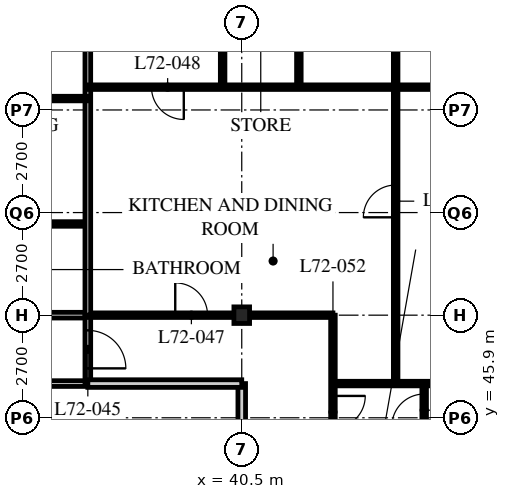
"""IFC4 building model, lengths in metres.
Left out: names, types, materials, properties, quantities, classifications, styles, units other than length and angle.
Written with IfcOpenShell. Run it as: python <this file> out.ifc"""

import sys

from ifc_helpers import new_model, si_unit, direction, frame, frame_2d, origin, origin_2d, place, context, subcontext, project, spatial, rectangle, i_section, extrude, element, fill, save


model = new_model("IFC4")
c1 = context("Model", 3, precision=1e-05, world=origin(), true_north=direction((0.0, 1.0)))
c2 = subcontext(c1, "Body", "Model", "MODEL_VIEW")
j1 = project(units=[si_unit("LENGTHUNIT", "METRE"), si_unit("PLANEANGLEUNIT", "RADIAN")], contexts=[c1])
p1 = place(None, origin())
s1 = spatial("IfcSite", under=j1, at=p1, CompositionType="ELEMENT")
p2 = place(p1, origin())
s2 = spatial("IfcBuilding", under=s1, at=p2, CompositionType="ELEMENT")
p3 = place(p2, frame((0.0, 0.0, 281.4)))
s3 = spatial("IfcBuildingStorey", under=s2, at=p3, CompositionType="ELEMENT", Elevation=281.4)
p4 = place(p3, frame((40.5, 48.6, 0.0), z_axis=(0.0, 0.0, 1.0), x_axis=(1.0, 0.0, 0.0)))
e1 = element("IfcColumn", 1, at=p4, inside=s3, PredefinedType="COLUMN", context=c2, shape_type="SweptSolid", body=[
    extrude(i_section(OverallWidth=0.412, OverallDepth=0.437, WebThickness=0.036, FlangeThickness=0.058, FilletRadius=0.015, at=origin_2d()), origin(), (0.0, 0.0, 1.0), 3.9),
])
p5 = place(p3, frame((12.15, 48.6, 0.0), z_axis=(0.0, 0.0, 1.0), x_axis=(1.0, 0.0, 0.0)))
e2 = element("IfcWall", 2, at=p5, inside=s3, PredefinedType="PARTITIONING", context=c2, shape_type="SweptSolid", body=[
    extrude(rectangle(XDim=24.3, YDim=0.15, at=frame_2d((12.15, 0.0))), origin(), (0.0, 0.0, 1.0), 3.078),
])
p6 = place(p5, frame((4.95, 0.0, 0.0)))
e3 = element("IfcOpeningElement", 3, at=p6, cuts=e2, PredefinedType="OPENING", context=c2, shape_type="SweptSolid", body=[
    extrude(rectangle(XDim=1.0, YDim=2.1, at=frame_2d((0.5, 1.05))), frame((0.0, 0.085, 0.0), z_axis=(0.0, -1.0, 0.0), x_axis=(1.0, 0.0, 0.0)), (0.0, 0.0, 1.0), 0.17),
])
p7 = place(p5, frame((16.6, 0.0, 0.0)))
e4 = element("IfcOpeningElement", 4, at=p7, cuts=e2, PredefinedType="OPENING", context=c2, shape_type="SweptSolid", body=[
    extrude(rectangle(XDim=1.0, YDim=2.1, at=frame_2d((0.5, 1.05))), frame((0.0, 0.085, 0.0), z_axis=(0.0, -1.0, 0.0), x_axis=(1.0, 0.0, 0.0)), (0.0, 0.0, 1.0), 0.17),
])
p8 = place(p5, frame((1.525, 0.0, 0.0)))
e5 = element("IfcOpeningElement", 5, at=p8, cuts=e2, PredefinedType="OPENING", context=c2, shape_type="SweptSolid", body=[
    extrude(rectangle(XDim=1.0, YDim=2.1, at=frame_2d((0.5, 1.05))), frame((0.0, 0.085, 0.0), z_axis=(0.0, -1.0, 0.0), x_axis=(1.0, 0.0, 0.0)), (0.0, 0.0, 1.0), 0.17),
])
p9 = place(p3, frame((29.56, 46.8, 0.0), z_axis=(0.0, 0.0, 1.0), x_axis=(1.0, 0.0, 0.0)))
e6 = element("IfcWall", 6, at=p9, inside=s3, PredefinedType="PARTITIONING", context=c2, shape_type="SweptSolid", body=[
    extrude(rectangle(XDim=6.89, YDim=0.15, at=frame_2d((3.445, 0.0))), origin(), (0.0, 0.0, 1.0), 3.69),
])
p10 = place(p9, frame((2.69, 0.0, 0.0)))
e7 = element("IfcOpeningElement", 7, at=p10, cuts=e6, PredefinedType="OPENING", context=c2, shape_type="SweptSolid", body=[
    extrude(rectangle(XDim=1.0, YDim=2.1, at=frame_2d((0.5, 1.05))), frame((0.0, 0.085, 0.0), z_axis=(0.0, -1.0, 0.0), x_axis=(1.0, 0.0, 0.0)), (0.0, 0.0, 1.0), 0.17),
])
p11 = place(p3, frame((36.45, 46.8, 0.0), z_axis=(0.0, 0.0, 1.0), x_axis=(0.0, 1.0, 0.0)))
e8 = element("IfcWall", 8, at=p11, inside=s3, PredefinedType="PARTITIONING", context=c2, shape_type="SweptSolid", body=[
    extrude(rectangle(XDim=1.8, YDim=0.15, at=frame_2d((0.9, 0.0))), origin(), (0.0, 0.0, 1.0), 3.69),
])
p12 = place(p11, frame((0.4, 0.0, 0.0)))
e9 = element("IfcOpeningElement", 9, at=p12, cuts=e8, PredefinedType="OPENING", context=c2, shape_type="SweptSolid", body=[
    extrude(rectangle(XDim=1.0, YDim=2.1, at=frame_2d((0.5, 1.05))), frame((0.0, 0.085, 0.0), z_axis=(0.0, -1.0, 0.0), x_axis=(1.0, 0.0, 0.0)), (0.0, 0.0, 1.0), 0.17),
])
p13 = place(p3, frame((40.5, 40.5, 0.0), z_axis=(0.0, 0.0, 1.0), x_axis=(0.0, 1.0, 0.0)))
e10 = element("IfcWall", 10, at=p13, inside=s3, PredefinedType="SOLIDWALL", context=c2, shape_type="SweptSolid", body=[
    extrude(rectangle(XDim=6.3, YDim=0.2, at=frame_2d((3.15, 0.0))), origin(), (0.0, 0.0, 1.0), 3.078),
])
p14 = place(p3, frame((8.15, 51.0, 0.0), z_axis=(0.0, 0.0, 1.0), x_axis=(1.0, 0.0, 0.0)))
e11 = element("IfcWall", 11, at=p14, inside=s3, PredefinedType="PARTITIONING", context=c2, shape_type="SweptSolid", body=[
    extrude(rectangle(XDim=28.3, YDim=0.12, at=frame_2d((14.15, 0.0))), origin(), (0.0, 0.0, 1.0), 3.69),
])
p15 = place(p14, frame((9.025, 0.0, 0.0)))
e12 = element("IfcOpeningElement", 12, at=p15, cuts=e11, PredefinedType="OPENING", context=c2, shape_type="SweptSolid", body=[
    extrude(rectangle(XDim=0.85, YDim=2.1, at=frame_2d((0.425, 1.05))), frame((0.0, 0.07, 0.0), z_axis=(0.0, -1.0, 0.0), x_axis=(1.0, 0.0, 0.0)), (0.0, 0.0, 1.0), 0.14),
])
p16 = place(p14, frame((16.475, 0.0, 0.0)))
e13 = element("IfcOpeningElement", 13, at=p16, cuts=e11, PredefinedType="OPENING", context=c2, shape_type="SweptSolid", body=[
    extrude(rectangle(XDim=0.85, YDim=2.1, at=frame_2d((0.425, 1.05))), frame((0.0, 0.07, 0.0), z_axis=(0.0, -1.0, 0.0), x_axis=(1.0, 0.0, 0.0)), (0.0, 0.0, 1.0), 0.14),
])
p17 = place(p14, frame((21.175, 0.0, 0.0)))
e14 = element("IfcOpeningElement", 14, at=p17, cuts=e11, PredefinedType="OPENING", context=c2, shape_type="SweptSolid", body=[
    extrude(rectangle(XDim=0.85, YDim=2.1, at=frame_2d((0.425, 1.05))), frame((0.0, 0.07, 0.0), z_axis=(0.0, -1.0, 0.0), x_axis=(1.0, 0.0, 0.0)), (0.0, 0.0, 1.0), 0.14),
])
p18 = place(p14, frame((24.575, 0.0, 0.0)))
e15 = element("IfcOpeningElement", 15, at=p18, cuts=e11, PredefinedType="OPENING", context=c2, shape_type="SweptSolid", body=[
    extrude(rectangle(XDim=0.85, YDim=2.1, at=frame_2d((0.425, 1.05))), frame((0.0, 0.07, 0.0), z_axis=(0.0, -1.0, 0.0), x_axis=(1.0, 0.0, 0.0)), (0.0, 0.0, 1.0), 0.14),
])
p19 = place(p14, frame((6.725, 0.0, 0.0)))
e16 = element("IfcOpeningElement", 16, at=p19, cuts=e11, PredefinedType="OPENING", context=c2, shape_type="SweptSolid", body=[
    extrude(rectangle(XDim=0.85, YDim=2.1, at=frame_2d((0.425, 1.05))), frame((0.0, 0.07, 0.0), z_axis=(0.0, -1.0, 0.0), x_axis=(1.0, 0.0, 0.0)), (0.0, 0.0, 1.0), 0.14),
])
p20 = place(p14, frame((2.875, 0.0, 0.0)))
e17 = element("IfcOpeningElement", 17, at=p20, cuts=e11, PredefinedType="OPENING", context=c2, shape_type="SweptSolid", body=[
    extrude(rectangle(XDim=0.85, YDim=2.1, at=frame_2d((0.425, 1.05))), frame((0.0, 0.07, 0.0), z_axis=(0.0, -1.0, 0.0), x_axis=(1.0, 0.0, 0.0)), (0.0, 0.0, 1.0), 0.14),
])
p21 = place(p3, frame((42.9, 48.6, 0.0), z_axis=(0.0, 0.0, 1.0), x_axis=(0.0, -1.0, 0.0)))
e18 = element("IfcWall", 18, at=p21, inside=s3, PredefinedType="PARTITIONING", context=c2, shape_type="SweptSolid", body=[
    extrude(rectangle(XDim=12.15, YDim=0.12, at=frame_2d((6.075, 0.0))), origin(), (0.0, 0.0, 1.0), 3.69),
])
p22 = place(p21, frame((2.125, 0.0, 0.0)))
e19 = element("IfcOpeningElement", 19, at=p22, cuts=e18, PredefinedType="OPENING", context=c2, shape_type="SweptSolid", body=[
    extrude(rectangle(XDim=0.85, YDim=2.1, at=frame_2d((0.425, 1.05))), frame((0.0, 0.07, 0.0), z_axis=(0.0, -1.0, 0.0), x_axis=(1.0, 0.0, 0.0)), (0.0, 0.0, 1.0), 0.14),
])
p23 = place(p21, frame((8.425, 0.0, 0.0)))
e20 = element("IfcOpeningElement", 20, at=p23, cuts=e18, PredefinedType="OPENING", context=c2, shape_type="SweptSolid", body=[
    extrude(rectangle(XDim=0.85, YDim=2.1, at=frame_2d((0.425, 1.05))), frame((0.0, 0.07, 0.0), z_axis=(0.0, -1.0, 0.0), x_axis=(1.0, 0.0, 0.0)), (0.0, 0.0, 1.0), 0.14),
])
p24 = place(p3, frame((36.45, 48.6, 0.0), z_axis=(0.0, 0.0, 1.0), x_axis=(1.0, 0.0, 0.0)))
e21 = element("IfcWall", 21, at=p24, inside=s3, PredefinedType="PARTITIONING", context=c2, shape_type="SweptSolid", body=[
    extrude(rectangle(XDim=6.45, YDim=0.12, at=frame_2d((3.225, 0.0))), origin(), (0.0, 0.0, 1.0), 3.078),
])
p25 = place(p24, frame((2.3, 0.0, 0.0)))
e22 = element("IfcOpeningElement", 22, at=p25, cuts=e21, PredefinedType="OPENING", context=c2, shape_type="SweptSolid", body=[
    extrude(rectangle(XDim=0.85, YDim=2.1, at=frame_2d((0.425, 1.05))), frame((0.0, 0.07, 0.0), z_axis=(0.0, -1.0, 0.0), x_axis=(1.0, 0.0, 0.0)), (0.0, 0.0, 1.0), 0.14),
])
p26 = place(p3, frame((36.45, 46.8, 0.0), z_axis=(0.0, 0.0, 1.0), x_axis=(1.0, 0.0, 0.0)))
e23 = element("IfcWall", 23, at=p26, inside=s3, PredefinedType="SOLIDWALL", context=c2, shape_type="SweptSolid", body=[
    extrude(rectangle(XDim=4.05, YDim=0.2, at=frame_2d((2.025, 0.0))), origin(), (0.0, 0.0, 1.0), 3.69),
])
p27 = place(p3, frame((42.9, 46.8, 0.0), z_axis=(0.0, 0.0, 1.0), x_axis=(1.0, 0.0, 0.0)))
e24 = element("IfcWall", 24, at=p27, inside=s3, PredefinedType="PARTITIONING", context=c2, shape_type="SweptSolid", body=[
    extrude(rectangle(XDim=13.5, YDim=0.12, at=frame_2d((6.75, 0.0))), origin(), (0.0, 0.0, 1.0), 3.69),
])
p28 = place(p3, frame((36.45, 64.5, 0.0), z_axis=(0.0, 0.0, 1.0), x_axis=(0.0, -1.0, 0.0)))
e25 = element("IfcWall", 25, at=p28, inside=s3, PredefinedType="PARTITIONING", context=c2, shape_type="SweptSolid", body=[
    extrude(rectangle(XDim=15.9, YDim=0.15, at=frame_2d((7.95, 0.0))), origin(), (0.0, 0.0, 1.0), 3.69),
])
p29 = place(p3, frame((36.45, 54.6, 0.0), z_axis=(0.0, 0.0, 1.0), x_axis=(1.0, 0.0, 0.0)))
e26 = element("IfcWall", 26, at=p29, inside=s3, PredefinedType="PARTITIONING", context=c2, shape_type="SweptSolid", body=[
    extrude(rectangle(XDim=19.95, YDim=0.12, at=frame_2d((9.975, 0.0))), origin(), (0.0, 0.0, 1.0), 3.69),
])
p30 = place(p29, frame((1.675, 0.0, 0.0)))
e27 = element("IfcOpeningElement", 27, at=p30, cuts=e26, PredefinedType="OPENING", context=c2, shape_type="SweptSolid", body=[
    extrude(rectangle(XDim=0.85, YDim=2.1, at=frame_2d((0.425, 1.05))), frame((0.0, 0.07, 0.0), z_axis=(0.0, -1.0, 0.0), x_axis=(1.0, 0.0, 0.0)), (0.0, 0.0, 1.0), 0.14),
])
p31 = place(p3, frame((44.55, 64.5, 0.0), z_axis=(0.0, 0.0, 1.0), x_axis=(0.0, -1.0, 0.0)))
e28 = element("IfcWall", 28, at=p31, inside=s3, PredefinedType="PARTITIONING", context=c2, shape_type="SweptSolid", body=[
    extrude(rectangle(XDim=17.7, YDim=0.12, at=frame_2d((8.85, 0.0))), origin(), (0.0, 0.0, 1.0), 3.69),
])
p32 = place(p31, frame((12.475, 0.0, 0.0)))
e29 = element("IfcOpeningElement", 29, at=p32, cuts=e28, PredefinedType="OPENING", context=c2, shape_type="SweptSolid", body=[
    extrude(rectangle(XDim=0.85, YDim=2.1, at=frame_2d((0.425, 1.05))), frame((0.0, 0.07, 0.0), z_axis=(0.0, -1.0, 0.0), x_axis=(1.0, 0.0, 0.0)), (0.0, 0.0, 1.0), 0.14),
])
p33 = place(p31, frame((4.525, 0.0, 0.0)))
e30 = element("IfcOpeningElement", 30, at=p33, cuts=e28, PredefinedType="OPENING", context=c2, shape_type="SweptSolid", body=[
    extrude(rectangle(XDim=0.85, YDim=2.1, at=frame_2d((0.425, 1.05))), frame((0.0, 0.07, 0.0), z_axis=(0.0, -1.0, 0.0), x_axis=(1.0, 0.0, 0.0)), (0.0, 0.0, 1.0), 0.14),
])
p34 = place(p3, frame((45.3, 46.8, 0.0), z_axis=(0.0, 0.0, 1.0), x_axis=(0.0, -1.0, 0.0)))
e31 = element("IfcWall", 31, at=p34, inside=s3, PredefinedType="PARTITIONING", context=c2, shape_type="SweptSolid", body=[
    extrude(rectangle(XDim=4.01, YDim=0.12, at=frame_2d((2.005, 0.0))), origin(), (0.0, 0.0, 1.0), 3.69),
])
p35 = place(p34, frame((0.275, 0.0, 0.0)))
e32 = element("IfcOpeningElement", 32, at=p35, cuts=e31, PredefinedType="OPENING", context=c2, shape_type="SweptSolid", body=[
    extrude(rectangle(XDim=0.85, YDim=2.1, at=frame_2d((0.425, 1.05))), frame((0.0, 0.07, 0.0), z_axis=(0.0, -1.0, 0.0), x_axis=(1.0, 0.0, 0.0)), (0.0, 0.0, 1.0), 0.14),
])
p36 = place(p3, frame((32.4, 54.3, 0.0), z_axis=(0.0, 0.0, 1.0), x_axis=(1.0, 0.0, 0.0)))
e33 = element("IfcWall", 33, at=p36, inside=s3, PredefinedType="PARTITIONING", context=c2, shape_type="SweptSolid", body=[
    extrude(rectangle(XDim=4.05, YDim=0.12, at=frame_2d((2.025, 0.0))), origin(), (0.0, 0.0, 1.0), 3.69),
])
p37 = place(p36, frame((1.6, 0.0, 0.0)))
e34 = element("IfcOpeningElement", 34, at=p37, cuts=e33, PredefinedType="OPENING", context=c2, shape_type="SweptSolid", body=[
    extrude(rectangle(XDim=0.85, YDim=2.1, at=frame_2d((0.425, 1.05))), frame((0.0, 0.07, 0.0), z_axis=(0.0, -1.0, 0.0), x_axis=(1.0, 0.0, 0.0)), (0.0, 0.0, 1.0), 0.14),
])
for number, where, z_axis, x_axis in (
    (35, (39.997, 54.6, 0.0), (0.0, 0.0, 1.0), (0.0, 1.0, 0.0)),
    (36, (42.003, 54.6, 0.0), (0.0, 0.0, 1.0), (0.0, 1.0, 0.0)),
):
    element("IfcWall", number, at=place(p3, frame(where, z_axis=z_axis, x_axis=x_axis)), inside=s3, PredefinedType="PARTITIONING", context=c2, shape_type="SweptSolid", body=[
        extrude(rectangle(XDim=2.363, YDim=0.12, at=frame_2d((1.181, 0.0))), origin(), (0.0, 0.0, 1.0), 3.69),
    ])
p38 = place(p12, origin())
e37 = element("IfcDoor", 37, at=p38, inside=s3, OperationType="SINGLE_SWING_RIGHT", PredefinedType="DOOR", context=c2, shape_type="SweptSolid", body=[
    extrude(rectangle(XDim=1.0, YDim=2.1, at=frame_2d((0.5, 1.05))), frame((0.0, 0.025, 0.0), z_axis=(0.0, -1.0, 0.0), x_axis=(1.0, 0.0, 0.0)), (0.0, 0.0, 1.0), 0.05),
])
fill(e9, e37)
p39 = place(p25, origin())
e38 = element("IfcDoor", 38, at=p39, inside=s3, OperationType="SINGLE_SWING_LEFT", PredefinedType="DOOR", context=c2, shape_type="SweptSolid", body=[
    extrude(rectangle(XDim=0.85, YDim=2.1, at=frame_2d((0.425, 1.05))), frame((0.0, 0.025, 0.0), z_axis=(0.0, -1.0, 0.0), x_axis=(1.0, 0.0, 0.0)), (0.0, 0.0, 1.0), 0.05),
])
fill(e22, e38)
p40 = place(p30, origin())
e39 = element("IfcDoor", 39, at=p40, inside=s3, OperationType="SINGLE_SWING_LEFT", PredefinedType="DOOR", context=c2, shape_type="SweptSolid", body=[
    extrude(rectangle(XDim=0.85, YDim=2.1, at=frame_2d((0.425, 1.05))), frame((0.0, 0.025, 0.0), z_axis=(0.0, -1.0, 0.0), x_axis=(1.0, 0.0, 0.0)), (0.0, 0.0, 1.0), 0.05),
])
fill(e27, e39)
p41 = place(p32, origin())
e40 = element("IfcDoor", 40, at=p41, inside=s3, OperationType="SINGLE_SWING_LEFT", PredefinedType="DOOR", context=c2, shape_type="SweptSolid", body=[
    extrude(rectangle(XDim=0.85, YDim=2.1, at=frame_2d((0.425, 1.05))), frame((0.0, 0.025, 0.0), z_axis=(0.0, -1.0, 0.0), x_axis=(1.0, 0.0, 0.0)), (0.0, 0.0, 1.0), 0.05),
])
fill(e29, e40)
p42 = place(p22, origin())
e41 = element("IfcDoor", 41, at=p42, inside=s3, OperationType="SINGLE_SWING_LEFT", PredefinedType="DOOR", context=c2, shape_type="SweptSolid", body=[
    extrude(rectangle(XDim=0.85, YDim=2.1, at=frame_2d((0.425, 1.05))), frame((0.0, 0.025, 0.0), z_axis=(0.0, -1.0, 0.0), x_axis=(1.0, 0.0, 0.0)), (0.0, 0.0, 1.0), 0.05),
])
fill(e19, e41)
p43 = place(p35, origin())
e42 = element("IfcDoor", 42, at=p43, inside=s3, OperationType="SINGLE_SWING_LEFT", PredefinedType="DOOR", context=c2, shape_type="SweptSolid", body=[
    extrude(rectangle(XDim=0.85, YDim=2.1, at=frame_2d((0.425, 1.05))), frame((0.0, 0.025, 0.0), z_axis=(0.0, -1.0, 0.0), x_axis=(1.0, 0.0, 0.0)), (0.0, 0.0, 1.0), 0.05),
])
fill(e32, e42)
save(model, sys.argv[1])
